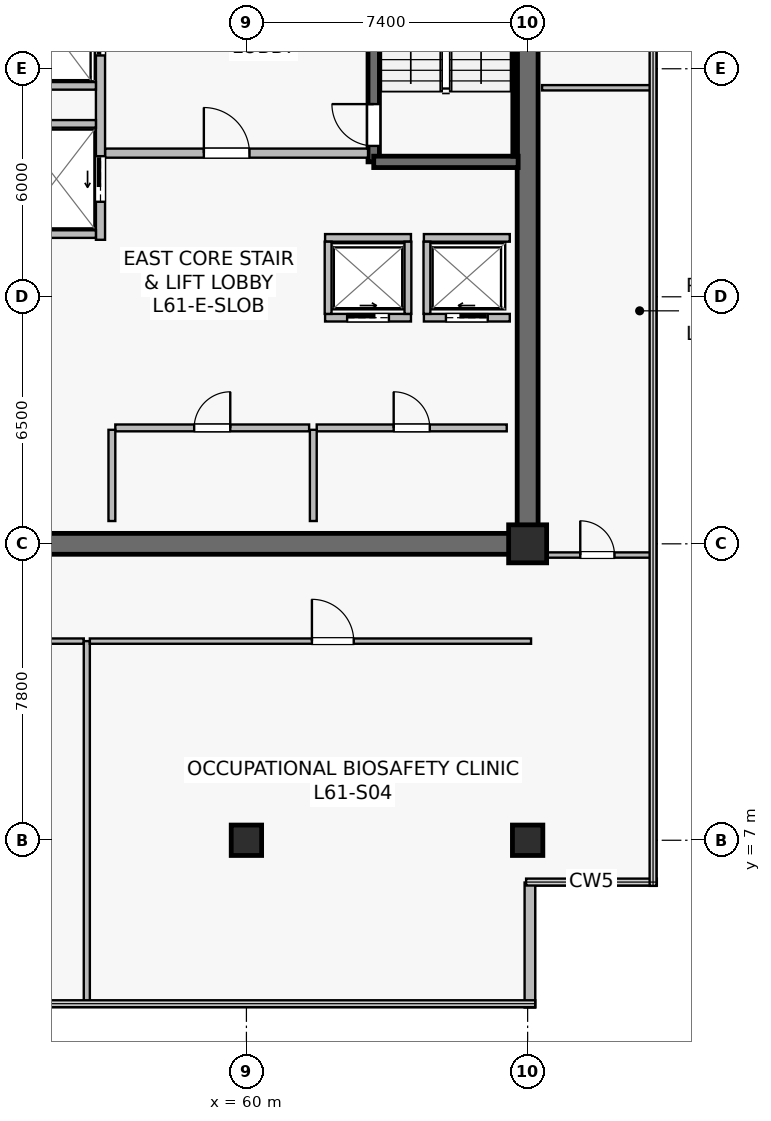
"""IFC4 building model, lengths in metres.
Left out: names, types, materials, properties, quantities, classifications, styles, units other than length and angle.
Written with IfcOpenShell. Run it as: python <this file> out.ifc"""

import sys

from ifc_helpers import new_model, si_unit, direction, frame, frame_2d, origin, origin_2d, place, context, subcontext, project, spatial, rectangle, extrude, source, transform, mapped, element, fill, save


model = new_model("IFC4")
c1 = context("Model", 3, precision=1e-05, world=origin(), true_north=direction((0.0, 1.0)))
c2 = subcontext(c1, "Body", "Model", "MODEL_VIEW")
j1 = project(units=[si_unit("LENGTHUNIT", "METRE"), si_unit("PLANEANGLEUNIT", "RADIAN")], contexts=[c1])
p1 = place(None, origin())
s1 = spatial("IfcSite", under=j1, at=p1, CompositionType="ELEMENT")
p2 = place(p1, origin())
s2 = spatial("IfcBuilding", under=s1, at=p2, CompositionType="ELEMENT")
p3 = place(p2, frame((0.0, 0.0, 254.7)))
s3 = spatial("IfcBuildingStorey", under=s2, at=p3, CompositionType="ELEMENT", Elevation=254.7)
p4 = place(p3, frame((52.325, 14.8, 0.0), z_axis=(0.0, 0.0, 1.0), x_axis=(1.0, 0.0, 0.0)))
e1 = element("IfcWall", 1, at=p4, inside=s3, PredefinedType="SHEAR", context=c2, shape_type="SweptSolid", body=[
    extrude(rectangle(XDim=15.35, YDim=0.55, at=frame_2d((7.675, 0.0))), origin(), (0.0, 0.0, 1.0), 3.8),
])
p5 = place(p3, frame((67.4, 15.075, 0.0), z_axis=(0.0, 0.0, 1.0), x_axis=(0.0, 1.0, 0.0)))
e2 = element("IfcWall", 2, at=p5, inside=s3, PredefinedType="SHEAR", context=c2, shape_type="SweptSolid", body=[
    extrude(rectangle(XDim=18.45, YDim=0.55, at=frame_2d((9.225, 0.0))), origin(), (0.0, 0.0, 1.0), 3.8),
])
p6 = place(p3, frame((63.35, 24.85, 0.0), z_axis=(0.0, 0.0, 1.0), x_axis=(0.0, 1.0, 0.0)))
e3 = element("IfcWall", 3, at=p6, inside=s3, PredefinedType="SHEAR", context=c2, shape_type="SweptSolid", body=[
    extrude(rectangle(XDim=8.63, YDim=0.3, at=frame_2d((4.315, 0.0))), origin(), (0.0, 0.0, 1.0), 3.8),
])
p7 = place(p6, frame((0.42, 0.0, 0.0)))
e4 = element("IfcOpeningElement", 4, at=p7, cuts=e3, PredefinedType="OPENING", context=c2, shape_type="SweptSolid", body=[
    extrude(rectangle(XDim=1.1, YDim=2.15, at=frame_2d((0.55, 1.075))), frame((0.0, 0.16, 0.0), z_axis=(0.0, -1.0, 0.0), x_axis=(1.0, 0.0, 0.0)), (0.0, 0.0, 1.0), 0.32),
])
p8 = place(p3, frame((63.35, 24.85, 0.0), z_axis=(0.0, 0.0, 1.0), x_axis=(1.0, 0.0, 0.0)))
e5 = element("IfcWall", 5, at=p8, inside=s3, PredefinedType="SHEAR", context=c2, shape_type="SweptSolid", body=[
    extrude(rectangle(XDim=3.8, YDim=0.3, at=frame_2d((1.9, 0.0))), origin(), (0.0, 0.0, 1.0), 3.8),
])
p9 = place(p3, frame((67.07, 25.0, 0.0), z_axis=(0.0, 0.0, 1.0), x_axis=(0.0, 1.0, 0.0)))
e6 = element("IfcWall", 6, at=p9, inside=s3, PredefinedType="SOLIDWALL", context=c2, shape_type="SweptSolid", body=[
    extrude(rectangle(XDim=8.32, YDim=0.12, at=frame_2d((4.16, 0.0))), origin(), (0.0, 0.0, 1.0), 3.8),
])
m1 = source(origin(), c2, "Body", "SweptSolid", [
    extrude(rectangle(XDim=0.8, YDim=0.8, at=origin_2d()), origin(), (0.0, 0.0, 1.0), 4.1),
])
p10 = place(p3, frame((60.0, 7.0, 0.0), z_axis=(0.0, 0.0, 1.0), x_axis=(1.0, 0.0, 0.0)))
e7 = element("IfcColumn", 7, at=p10, inside=s3, PredefinedType="COLUMN", context=c2, shape_type="MappedRepresentation", body=[
    mapped(m1, transform((0.0, 0.0, 0.0), scale=1.0)),
])
m2 = source(origin(), c2, "Body", "SweptSolid", [
    extrude(rectangle(XDim=1.0, YDim=1.0, at=origin_2d()), origin(), (0.0, 0.0, 1.0), 4.1),
])
p11 = place(p3, frame((67.4, 14.8, 0.0), z_axis=(0.0, 0.0, 1.0), x_axis=(1.0, 0.0, 0.0)))
e8 = element("IfcColumn", 8, at=p11, inside=s3, PredefinedType="COLUMN", context=c2, shape_type="MappedRepresentation", body=[
    mapped(m2, transform((0.0, 0.0, 0.0), scale=1.0)),
])
p12 = place(p3, frame((67.4, 7.0, 0.0), z_axis=(0.0, 0.0, 1.0), x_axis=(1.0, 0.0, 0.0)))
e9 = element("IfcColumn", 9, at=p12, inside=s3, PredefinedType="COLUMN", context=c2, shape_type="MappedRepresentation", body=[
    mapped(m1, transform((0.0, 0.0, 0.0), scale=1.0)),
])
p13 = place(p3, frame((67.46, 2.6, 0.0), z_axis=(0.0, 0.0, 1.0), x_axis=(0.0, 1.0, 0.0)))
e10 = element("IfcWall", 10, at=p13, inside=s3, PredefinedType="STANDARD", context=c2, shape_type="SweptSolid", body=[
    extrude(rectangle(XDim=3.288, YDim=0.28, at=frame_2d((1.644, 0.0))), origin(), (0.0, 0.0, 1.0), 3.8),
])
p14 = place(p3, frame((56.28, 25.08, 0.0), z_axis=(0.0, 0.0, 1.0), x_axis=(1.0, 0.0, 0.0)))
e11 = element("IfcWall", 11, at=p14, inside=s3, PredefinedType="SOLIDWALL", context=c2, shape_type="SweptSolid", body=[
    extrude(rectangle(XDim=6.92, YDim=0.24, at=frame_2d((3.46, 0.0))), origin(), (0.0, 0.0, 1.0), 3.197),
])
p15 = place(p14, frame((2.6, 0.0, 0.0)))
e12 = element("IfcOpeningElement", 12, at=p15, cuts=e11, PredefinedType="OPENING", context=c2, shape_type="SweptSolid", body=[
    extrude(rectangle(XDim=1.2, YDim=2.16, at=frame_2d((0.6, 1.08))), frame((0.0, 0.13, 0.0), z_axis=(0.0, -1.0, 0.0), x_axis=(1.0, 0.0, 0.0)), (0.0, 0.0, 1.0), 0.26),
])
p16 = place(p3, frame((56.16, 22.8, 0.0), z_axis=(0.0, 0.0, 1.0), x_axis=(0.0, 1.0, 0.0)))
e13 = element("IfcWall", 13, at=p16, inside=s3, PredefinedType="SOLIDWALL", context=c2, shape_type="SweptSolid", body=[
    extrude(rectangle(XDim=6.85, YDim=0.24, at=frame_2d((3.425, 0.0))), origin(), (0.0, 0.0, 1.0), 2.935),
])
p17 = place(p16, frame((4.85, 0.0, 0.0)))
e14 = element("IfcOpeningElement", 14, at=p17, cuts=e13, PredefinedType="OPENING", context=c2, shape_type="SweptSolid", body=[
    extrude(rectangle(XDim=1.1, YDim=2.22, at=frame_2d((0.55, 1.11))), frame((0.0, 0.13, 0.0), z_axis=(0.0, -1.0, 0.0), x_axis=(1.0, 0.0, 0.0)), (0.0, 0.0, 1.0), 0.26),
])
p18 = place(p16, frame((1.0, 0.0, 0.0)))
e15 = element("IfcOpeningElement", 15, at=p18, cuts=e13, PredefinedType="OPENING", context=c2, shape_type="SweptSolid", body=[
    extrude(rectangle(XDim=1.2, YDim=2.22, at=frame_2d((0.6, 1.11))), frame((0.0, 0.13, 0.0), z_axis=(0.0, -1.0, 0.0), x_axis=(1.0, 0.0, 0.0)), (0.0, 0.0, 1.0), 0.26),
])
p19 = place(p3, frame((64.67, 20.75, 0.0), z_axis=(0.0, 0.0, 1.0), x_axis=(1.0, 0.0, 0.0)))
e16 = element("IfcWall", 16, at=p19, inside=s3, PredefinedType="SOLIDWALL", context=c2, shape_type="SweptSolid", body=[
    extrude(rectangle(XDim=2.26, YDim=0.2, at=frame_2d((1.13, 0.0))), origin(), (0.0, 0.0, 1.0), 3.8),
])
p20 = place(p19, frame((0.58, 0.0, 0.0)))
e17 = element("IfcOpeningElement", 17, at=p20, cuts=e16, PredefinedType="OPENING", context=c2, shape_type="SweptSolid", body=[
    extrude(rectangle(XDim=1.1, YDim=2.22, at=frame_2d((0.55, 1.11))), frame((0.0, 0.11, 0.0), z_axis=(0.0, -1.0, 0.0), x_axis=(1.0, 0.0, 0.0)), (0.0, 0.0, 1.0), 0.22),
])
p21 = place(p3, frame((64.67, 22.85, 0.0), z_axis=(0.0, 0.0, 1.0), x_axis=(1.0, 0.0, 0.0)))
e18 = element("IfcWall", 18, at=p21, inside=s3, PredefinedType="SOLIDWALL", context=c2, shape_type="SweptSolid", body=[
    extrude(rectangle(XDim=2.26, YDim=0.2, at=frame_2d((1.13, 0.0))), origin(), (0.0, 0.0, 1.0), 3.8),
])
p22 = place(p3, frame((64.75, 20.85, 0.0), z_axis=(0.0, 0.0, 1.0), x_axis=(0.0, 1.0, 0.0)))
e19 = element("IfcWall", 19, at=p22, inside=s3, PredefinedType="SOLIDWALL", context=c2, shape_type="SweptSolid", body=[
    extrude(rectangle(XDim=1.9, YDim=0.18, at=frame_2d((0.95, 0.0))), origin(), (0.0, 0.0, 1.0), 3.8),
])
p23 = place(p3, frame((62.07, 20.75, 0.0), z_axis=(0.0, 0.0, 1.0), x_axis=(1.0, 0.0, 0.0)))
e20 = element("IfcWall", 20, at=p23, inside=s3, PredefinedType="SOLIDWALL", context=c2, shape_type="SweptSolid", body=[
    extrude(rectangle(XDim=2.26, YDim=0.2, at=frame_2d((1.13, 0.0))), origin(), (0.0, 0.0, 1.0), 3.8),
])
p24 = place(p23, frame((0.58, 0.0, 0.0)))
e21 = element("IfcOpeningElement", 21, at=p24, cuts=e20, PredefinedType="OPENING", context=c2, shape_type="SweptSolid", body=[
    extrude(rectangle(XDim=1.1, YDim=2.22, at=frame_2d((0.55, 1.11))), frame((0.0, 0.11, 0.0), z_axis=(0.0, -1.0, 0.0), x_axis=(1.0, 0.0, 0.0)), (0.0, 0.0, 1.0), 0.22),
])
p25 = place(p3, frame((62.07, 22.85, 0.0), z_axis=(0.0, 0.0, 1.0), x_axis=(1.0, 0.0, 0.0)))
e22 = element("IfcWall", 22, at=p25, inside=s3, PredefinedType="SOLIDWALL", context=c2, shape_type="SweptSolid", body=[
    extrude(rectangle(XDim=2.26, YDim=0.2, at=frame_2d((1.13, 0.0))), origin(), (0.0, 0.0, 1.0), 3.8),
])
for number, where, z_axis, x_axis in (
    (23, (62.15, 20.85, 0.0), (0.0, 0.0, 1.0), (0.0, 1.0, 0.0)),
    (24, (64.25, 20.85, 0.0), (0.0, 0.0, 1.0), (0.0, 1.0, 0.0)),
):
    element("IfcWall", number, at=place(p3, frame(where, z_axis=z_axis, x_axis=x_axis)), inside=s3, PredefinedType="SOLIDWALL", context=c2, shape_type="SweptSolid", body=[
        extrude(rectangle(XDim=1.9, YDim=0.18, at=frame_2d((0.95, 0.0))), origin(), (0.0, 0.0, 1.0), 3.8),
    ])
p26 = place(p3, frame((53.85, 26.85, 0.0), z_axis=(0.0, 0.0, 1.0), x_axis=(1.0, 0.0, 0.0)))
e25 = element("IfcWall", 25, at=p26, inside=s3, PredefinedType="SOLIDWALL", context=c2, shape_type="SweptSolid", body=[
    extrude(rectangle(XDim=2.19, YDim=0.2, at=frame_2d((1.095, 0.0))), origin(), (0.0, 0.0, 1.0), 3.197),
])
for number, where, z_axis, x_axis in (
    (26, (53.85, 25.85, 0.0), (0.0, 0.0, 1.0), (1.0, 0.0, 0.0)),
    (27, (53.85, 22.95, 0.0), (0.0, 0.0, 1.0), (1.0, 0.0, 0.0)),
):
    element("IfcWall", number, at=place(p3, frame(where, z_axis=z_axis, x_axis=x_axis)), inside=s3, PredefinedType="SOLIDWALL", context=c2, shape_type="SweptSolid", body=[
        extrude(rectangle(XDim=2.19, YDim=0.2, at=frame_2d((1.095, 0.0))), origin(), (0.0, 0.0, 1.0), 3.8),
    ])
p27 = place(p3, frame((61.85, 17.85, 0.0), z_axis=(0.0, 0.0, 1.0), x_axis=(1.0, 0.0, 0.0)))
e28 = element("IfcWall", 28, at=p27, inside=s3, PredefinedType="SOLIDWALL", context=c2, shape_type="SweptSolid", body=[
    extrude(rectangle(XDim=5.0, YDim=0.18, at=frame_2d((2.5, 0.0))), origin(), (0.0, 0.0, 1.0), 3.8),
])
p28 = place(p27, frame((2.025, 0.0, 0.0)))
e29 = element("IfcOpeningElement", 29, at=p28, cuts=e28, PredefinedType="OPENING", context=c2, shape_type="SweptSolid", body=[
    extrude(rectangle(XDim=0.95, YDim=2.15, at=frame_2d((0.475, 1.075))), frame((0.0, 0.1, 0.0), z_axis=(0.0, -1.0, 0.0), x_axis=(1.0, 0.0, 0.0)), (0.0, 0.0, 1.0), 0.2),
])
p29 = place(p3, frame((61.76, 15.4, 0.0), z_axis=(0.0, 0.0, 1.0), x_axis=(0.0, 1.0, 0.0)))
e30 = element("IfcWall", 30, at=p29, inside=s3, PredefinedType="SOLIDWALL", context=c2, shape_type="SweptSolid", body=[
    extrude(rectangle(XDim=2.4, YDim=0.18, at=frame_2d((1.2, 0.0))), origin(), (0.0, 0.0, 1.0), 3.8),
])
p30 = place(p3, frame((56.55, 17.85, 0.0), z_axis=(0.0, 0.0, 1.0), x_axis=(1.0, 0.0, 0.0)))
e31 = element("IfcWall", 31, at=p30, inside=s3, PredefinedType="SOLIDWALL", context=c2, shape_type="SweptSolid", body=[
    extrude(rectangle(XDim=5.1, YDim=0.18, at=frame_2d((2.55, 0.0))), origin(), (0.0, 0.0, 1.0), 3.197),
])
p31 = place(p30, frame((2.075, 0.0, 0.0)))
e32 = element("IfcOpeningElement", 32, at=p31, cuts=e31, PredefinedType="OPENING", context=c2, shape_type="SweptSolid", body=[
    extrude(rectangle(XDim=0.95, YDim=2.15, at=frame_2d((0.475, 1.075))), frame((0.0, 0.1, 0.0), z_axis=(0.0, -1.0, 0.0), x_axis=(1.0, 0.0, 0.0)), (0.0, 0.0, 1.0), 0.2),
])
p32 = place(p3, frame((56.46, 15.4, 0.0), z_axis=(0.0, 0.0, 1.0), x_axis=(0.0, 1.0, 0.0)))
e33 = element("IfcWall", 33, at=p32, inside=s3, PredefinedType="SOLIDWALL", context=c2, shape_type="SweptSolid", body=[
    extrude(rectangle(XDim=2.4, YDim=0.18, at=frame_2d((1.2, 0.0))), origin(), (0.0, 0.0, 1.0), 3.8),
])
p33 = place(p3, frame((37.48, 12.24, 0.0), z_axis=(0.0, 0.0, 1.0), x_axis=(1.0, 0.0, 0.0)))
e34 = element("IfcWall", 34, at=p33, inside=s3, PredefinedType="PARTITIONING", context=c2, shape_type="SweptSolid", body=[
    extrude(rectangle(XDim=18.24, YDim=0.14, at=frame_2d((9.12, 0.0))), origin(), (0.0, 0.0, 1.0), 3.197),
])
p34 = place(p33, frame((7.583, 0.0, 0.0)))
e35 = element("IfcOpeningElement", 35, at=p34, cuts=e34, PredefinedType="OPENING", context=c2, shape_type="SweptSolid", body=[
    extrude(rectangle(XDim=1.1, YDim=2.18, at=frame_2d((0.55, 1.09))), frame((0.0, 0.08, 0.0), z_axis=(0.0, -1.0, 0.0), x_axis=(1.0, 0.0, 0.0)), (0.0, 0.0, 1.0), 0.16),
])
p35 = place(p3, frame((55.8, 2.71, 0.0), z_axis=(0.0, 0.0, 1.0), x_axis=(0.0, 1.0, 0.0)))
e36 = element("IfcWall", 36, at=p35, inside=s3, PredefinedType="PARTITIONING", context=c2, shape_type="SweptSolid", body=[
    extrude(rectangle(XDim=9.53, YDim=0.16, at=frame_2d((4.765, 0.0))), origin(), (0.0, 0.0, 1.0), 3.135),
])
p36 = place(p3, frame((55.88, 12.24, 0.0), z_axis=(0.0, 0.0, 1.0), x_axis=(1.0, 0.0, 0.0)))
e37 = element("IfcWall", 37, at=p36, inside=s3, PredefinedType="PARTITIONING", context=c2, shape_type="SweptSolid", body=[
    extrude(rectangle(XDim=11.61, YDim=0.14, at=frame_2d((5.805, 0.0))), origin(), (0.0, 0.0, 1.0), 3.197),
])
p37 = place(p36, frame((5.844, 0.0, 0.0)))
e38 = element("IfcOpeningElement", 38, at=p37, cuts=e37, PredefinedType="OPENING", context=c2, shape_type="SweptSolid", body=[
    extrude(rectangle(XDim=1.1, YDim=2.18, at=frame_2d((0.55, 1.09))), frame((0.0, 0.08, 0.0), z_axis=(0.0, -1.0, 0.0), x_axis=(1.0, 0.0, 0.0)), (0.0, 0.0, 1.0), 0.16),
])
p38 = place(p3, frame((67.78, 26.8, 0.0), z_axis=(0.0, 0.0, 1.0), x_axis=(1.0, 0.0, 0.0)))
e39 = element("IfcWall", 39, at=p38, inside=s3, PredefinedType="PARTITIONING", context=c2, shape_type="SweptSolid", body=[
    extrude(rectangle(XDim=2.91, YDim=0.14, at=frame_2d((1.455, 0.0))), origin(), (0.0, 0.0, 1.0), 3.8),
])
p39 = place(p3, frame((67.78, 14.505, 0.0), z_axis=(0.0, 0.0, 1.0), x_axis=(1.0, 0.0, 0.0)))
e40 = element("IfcWall", 40, at=p39, inside=s3, PredefinedType="PARTITIONING", context=c2, shape_type="SweptSolid", body=[
    extrude(rectangle(XDim=2.91, YDim=0.14, at=frame_2d((1.455, 0.0))), origin(), (0.0, 0.0, 1.0), 3.8),
])
p40 = place(p39, frame((1.005, 0.0, 0.0)))
e41 = element("IfcOpeningElement", 41, at=p40, cuts=e40, PredefinedType="OPENING", context=c2, shape_type="SweptSolid", body=[
    extrude(rectangle(XDim=0.9, YDim=2.1, at=frame_2d((0.45, 1.05))), frame((0.0, 0.08, 0.0), z_axis=(0.0, -1.0, 0.0), x_axis=(1.0, 0.0, 0.0)), (0.0, 0.0, 1.0), 0.16),
])
m3 = source(origin(), c2, "Body", "SweptSolid", [
    extrude(rectangle(XDim=1.1, YDim=2.15, at=frame_2d((0.55, 1.075))), frame((0.0, 0.025, 0.0), z_axis=(0.0, -1.0, 0.0), x_axis=(1.0, 0.0, 0.0)), (0.0, 0.0, 1.0), 0.05),
])
p41 = place(p7, origin())
e42 = element("IfcDoor", 42, at=p41, inside=s3, OperationType="SINGLE_SWING_RIGHT", PredefinedType="DOOR", context=c2, shape_type="MappedRepresentation", body=[
    mapped(m3, transform((0.0, 0.0, 0.0), scale=1.0)),
])
fill(e4, e42)
m4 = source(origin(), c2, "Body", "SweptSolid", [
    extrude(rectangle(XDim=1.2, YDim=2.16, at=frame_2d((0.6, 1.08))), frame((0.0, 0.025, 0.0), z_axis=(0.0, -1.0, 0.0), x_axis=(1.0, 0.0, 0.0)), (0.0, 0.0, 1.0), 0.05),
])
p42 = place(p15, origin())
e43 = element("IfcDoor", 43, at=p42, inside=s3, OperationType="SINGLE_SWING_LEFT", PredefinedType="DOOR", context=c2, shape_type="MappedRepresentation", body=[
    mapped(m4, transform((0.0, 0.0, 0.0), scale=1.0)),
])
fill(e12, e43)
m5 = source(origin(), c2, "Body", "SweptSolid", [
    extrude(rectangle(XDim=1.1, YDim=2.22, at=frame_2d((0.55, 1.11))), frame((0.0, 0.025, 0.0), z_axis=(0.0, -1.0, 0.0), x_axis=(1.0, 0.0, 0.0)), (0.0, 0.0, 1.0), 0.05),
])
p43 = place(p20, origin())
e44 = element("IfcDoor", 44, at=p43, inside=s3, OperationType="SLIDING_TO_LEFT", PredefinedType="USERDEFINED", context=c2, shape_type="MappedRepresentation", body=[
    mapped(m5, transform((0.0, 0.0, 0.0), scale=1.0)),
])
fill(e17, e44)
p44 = place(p24, origin())
e45 = element("IfcDoor", 45, at=p44, inside=s3, OperationType="SLIDING_TO_RIGHT", PredefinedType="USERDEFINED", context=c2, shape_type="MappedRepresentation", body=[
    mapped(m5, transform((0.0, 0.0, 0.0), scale=1.0)),
])
fill(e21, e45)
p45 = place(p17, origin())
e46 = element("IfcDoor", 46, at=p45, inside=s3, OperationType="SLIDING_TO_RIGHT", PredefinedType="USERDEFINED", context=c2, shape_type="MappedRepresentation", body=[
    mapped(m5, transform((0.0, 0.0, 0.0), scale=1.0)),
])
fill(e14, e46)
m6 = source(origin(), c2, "Body", "SweptSolid", [
    extrude(rectangle(XDim=1.2, YDim=2.22, at=frame_2d((0.6, 1.11))), frame((0.0, 0.025, 0.0), z_axis=(0.0, -1.0, 0.0), x_axis=(1.0, 0.0, 0.0)), (0.0, 0.0, 1.0), 0.05),
])
p46 = place(p18, origin())
e47 = element("IfcDoor", 47, at=p46, inside=s3, OperationType="SLIDING_TO_LEFT", PredefinedType="USERDEFINED", context=c2, shape_type="MappedRepresentation", body=[
    mapped(m6, transform((0.0, 0.0, 0.0), scale=1.0)),
])
fill(e15, e47)
m7 = source(origin(), c2, "Body", "SweptSolid", [
    extrude(rectangle(XDim=0.95, YDim=2.15, at=frame_2d((0.475, 1.075))), frame((0.0, 0.025, 0.0), z_axis=(0.0, -1.0, 0.0), x_axis=(1.0, 0.0, 0.0)), (0.0, 0.0, 1.0), 0.05),
])
p47 = place(p28, origin())
e48 = element("IfcDoor", 48, at=p47, inside=s3, OperationType="SINGLE_SWING_LEFT", PredefinedType="DOOR", context=c2, shape_type="MappedRepresentation", body=[
    mapped(m7, transform((0.0, 0.0, 0.0), scale=1.0)),
])
fill(e29, e48)
p48 = place(p31, origin())
e49 = element("IfcDoor", 49, at=p48, inside=s3, OperationType="SINGLE_SWING_RIGHT", PredefinedType="DOOR", context=c2, shape_type="MappedRepresentation", body=[
    mapped(m7, transform((0.0, 0.0, 0.0), scale=1.0)),
])
fill(e32, e49)
m8 = source(origin(), c2, "Body", "SweptSolid", [
    extrude(rectangle(XDim=1.1, YDim=2.18, at=frame_2d((0.55, 1.09))), frame((0.0, 0.025, 0.0), z_axis=(0.0, -1.0, 0.0), x_axis=(1.0, 0.0, 0.0)), (0.0, 0.0, 1.0), 0.05),
])
p49 = place(p37, origin())
e50 = element("IfcDoor", 50, at=p49, inside=s3, OperationType="SINGLE_SWING_LEFT", PredefinedType="DOOR", context=c2, shape_type="MappedRepresentation", body=[
    mapped(m8, transform((0.0, 0.0, 0.0), scale=1.0)),
])
fill(e38, e50)
m9 = source(origin(), c2, "Body", "SweptSolid", [
    extrude(rectangle(XDim=0.9, YDim=2.1, at=frame_2d((0.45, 1.05))), frame((0.0, 0.025, 0.0), z_axis=(0.0, -1.0, 0.0), x_axis=(1.0, 0.0, 0.0)), (0.0, 0.0, 1.0), 0.05),
])
p50 = place(p40, origin())
e51 = element("IfcDoor", 51, at=p50, inside=s3, OperationType="SINGLE_SWING_LEFT", PredefinedType="DOOR", context=c2, shape_type="MappedRepresentation", body=[
    mapped(m9, transform((0.0, 0.0, 0.0), scale=1.0)),
])
fill(e41, e51)
save(model, sys.argv[1])
